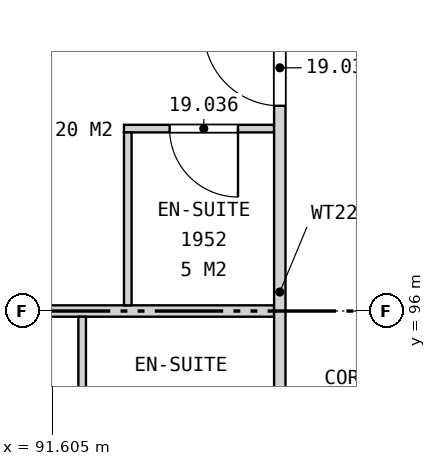
"""IFC4 building model, lengths in metres.
Left out: names, types, materials, properties, quantities, classifications, styles, units other than length and angle.
Written with IfcOpenShell. Run it as: python <this file> out.ifc"""

import sys

from ifc_helpers import new_model, si_unit, direction, frame, frame_2d, origin, place, context, subcontext, project, spatial, rectangle, extrude, element, fill, save


model = new_model("IFC4")
c1 = context("Model", 3, precision=1e-05, world=origin(), true_north=direction((0.0, 1.0)))
c2 = subcontext(c1, "Body", "Model", "MODEL_VIEW")
j1 = project(units=[si_unit("LENGTHUNIT", "METRE"), si_unit("PLANEANGLEUNIT", "RADIAN")], contexts=[c1])
p1 = place(None, origin())
s1 = spatial("IfcSite", under=j1, at=p1, CompositionType="ELEMENT")
p2 = place(p1, origin())
s2 = spatial("IfcBuilding", under=s1, at=p2, CompositionType="ELEMENT")
p3 = place(p2, frame((0.0, 0.0, 97.9)))
s3 = spatial("IfcBuildingStorey", under=s2, at=p3, CompositionType="ELEMENT", Elevation=97.9)
p4 = place(p3, frame((89.3, 96.0, 0.0), z_axis=(0.0, 0.0, 1.0), x_axis=(1.0, 0.0, 0.0)))
e1 = element("IfcWall", 1, at=p4, inside=s3, PredefinedType="PARTITIONING", context=c2, shape_type="SweptSolid", body=[
    extrude(rectangle(XDim=5.225, YDim=0.15, at=frame_2d((2.612, 0.0))), origin(), (0.0, 0.0, 1.0), 2.957),
])
p5 = place(p3, frame((92.55, 98.4, 0.0), z_axis=(0.0, 0.0, 1.0), x_axis=(1.0, 0.0, 0.0)))
e2 = element("IfcWall", 2, at=p5, inside=s3, PredefinedType="PLUMBINGWALL", context=c2, shape_type="SweptSolid", body=[
    extrude(rectangle(XDim=1.975, YDim=0.1, at=frame_2d((0.987, 0.0))), origin(), (0.0, 0.0, 1.0), 3.7),
])
p6 = place(p5, frame((0.6, 0.0, 0.0)))
e3 = element("IfcOpeningElement", 3, at=p6, cuts=e2, PredefinedType="OPENING", context=c2, shape_type="SweptSolid", body=[
    extrude(rectangle(XDim=0.9, YDim=2.1, at=frame_2d((0.45, 1.05))), frame((0.0, 0.06, 0.0), z_axis=(0.0, -1.0, 0.0), x_axis=(1.0, 0.0, 0.0)), (0.0, 0.0, 1.0), 0.12),
])
p7 = place(p3, frame((92.0, 93.05, 0.0), z_axis=(0.0, 0.0, 1.0), x_axis=(0.0, 1.0, 0.0)))
e4 = element("IfcWall", 4, at=p7, inside=s3, PredefinedType="PLUMBINGWALL", context=c2, shape_type="SweptSolid", body=[
    extrude(rectangle(XDim=2.875, YDim=0.1, at=frame_2d((1.438, 0.0))), origin(), (0.0, 0.0, 1.0), 3.7),
])
p8 = place(p3, frame((92.6, 96.075, 0.0), z_axis=(0.0, 0.0, 1.0), x_axis=(0.0, 1.0, 0.0)))
e5 = element("IfcWall", 5, at=p8, inside=s3, PredefinedType="PLUMBINGWALL", context=c2, shape_type="SweptSolid", body=[
    extrude(rectangle(XDim=2.275, YDim=0.1, at=frame_2d((1.138, 0.0))), origin(), (0.0, 0.0, 1.0), 3.7),
])
p9 = place(p3, frame((94.6, 87.5, 0.0), z_axis=(0.0, 0.0, 1.0), x_axis=(0.0, 1.0, 0.0)))
e6 = element("IfcWall", 6, at=p9, inside=s3, PredefinedType="PARTITIONING", context=c2, shape_type="SweptSolid", body=[
    extrude(rectangle(XDim=25.0, YDim=0.15, at=frame_2d((12.5, 0.0))), origin(), (0.0, 0.0, 1.0), 2.957),
])
p10 = place(p9, frame((2.4, 0.0, 0.0)))
e7 = element("IfcOpeningElement", 7, at=p10, cuts=e6, PredefinedType="OPENING", context=c2, shape_type="SweptSolid", body=[
    extrude(rectangle(XDim=1.2, YDim=2.2, at=frame_2d((0.6, 1.1))), frame((0.0, 0.085, 0.0), z_axis=(0.0, -1.0, 0.0), x_axis=(1.0, 0.0, 0.0)), (0.0, 0.0, 1.0), 0.17),
])
p11 = place(p9, frame((11.2, 0.0, 0.0)))
e8 = element("IfcOpeningElement", 8, at=p11, cuts=e6, PredefinedType="OPENING", context=c2, shape_type="SweptSolid", body=[
    extrude(rectangle(XDim=1.0, YDim=2.1, at=frame_2d((0.5, 1.05))), frame((0.0, 0.085, 0.0), z_axis=(0.0, -1.0, 0.0), x_axis=(1.0, 0.0, 0.0)), (0.0, 0.0, 1.0), 0.17),
])
p12 = place(p9, frame((12.8, 0.0, 0.0)))
e9 = element("IfcOpeningElement", 9, at=p12, cuts=e6, PredefinedType="OPENING", context=c2, shape_type="SweptSolid", body=[
    extrude(rectangle(XDim=1.0, YDim=2.1, at=frame_2d((0.5, 1.05))), frame((0.0, 0.085, 0.0), z_axis=(0.0, -1.0, 0.0), x_axis=(1.0, 0.0, 0.0)), (0.0, 0.0, 1.0), 0.17),
])
p13 = place(p9, frame((19.2, 0.0, 0.0)))
e10 = element("IfcOpeningElement", 10, at=p13, cuts=e6, PredefinedType="OPENING", context=c2, shape_type="SweptSolid", body=[
    extrude(rectangle(XDim=1.0, YDim=2.1, at=frame_2d((0.5, 1.05))), frame((0.0, 0.085, 0.0), z_axis=(0.0, -1.0, 0.0), x_axis=(1.0, 0.0, 0.0)), (0.0, 0.0, 1.0), 0.17),
])
p14 = place(p9, frame((20.8, 0.0, 0.0)))
e11 = element("IfcOpeningElement", 11, at=p14, cuts=e6, PredefinedType="OPENING", context=c2, shape_type="SweptSolid", body=[
    extrude(rectangle(XDim=1.0, YDim=2.1, at=frame_2d((0.5, 1.05))), frame((0.0, 0.085, 0.0), z_axis=(0.0, -1.0, 0.0), x_axis=(1.0, 0.0, 0.0)), (0.0, 0.0, 1.0), 0.17),
])
p15 = place(p11, origin())
e12 = element("IfcDoor", 12, at=p15, inside=s3, OperationType="SINGLE_SWING_RIGHT", PredefinedType="DOOR", context=c2, shape_type="SweptSolid", body=[
    extrude(rectangle(XDim=1.0, YDim=2.1, at=frame_2d((0.5, 1.05))), frame((0.0, 0.025, 0.0), z_axis=(0.0, -1.0, 0.0), x_axis=(1.0, 0.0, 0.0)), (0.0, 0.0, 1.0), 0.05),
])
fill(e8, e12)
p16 = place(p6, frame((0.9, 0.0, 0.0), z_axis=(0.0, 0.0, 1.0), x_axis=(-1.0, 0.0, 0.0)))
e13 = element("IfcDoor", 13, at=p16, inside=s3, OperationType="SINGLE_SWING_LEFT", PredefinedType="DOOR", context=c2, shape_type="SweptSolid", body=[
    extrude(rectangle(XDim=0.9, YDim=2.1, at=frame_2d((0.45, 1.05))), frame((0.0, 0.025, 0.0), z_axis=(0.0, -1.0, 0.0), x_axis=(1.0, 0.0, 0.0)), (0.0, 0.0, 1.0), 0.05),
])
fill(e3, e13)
save(model, sys.argv[1])
